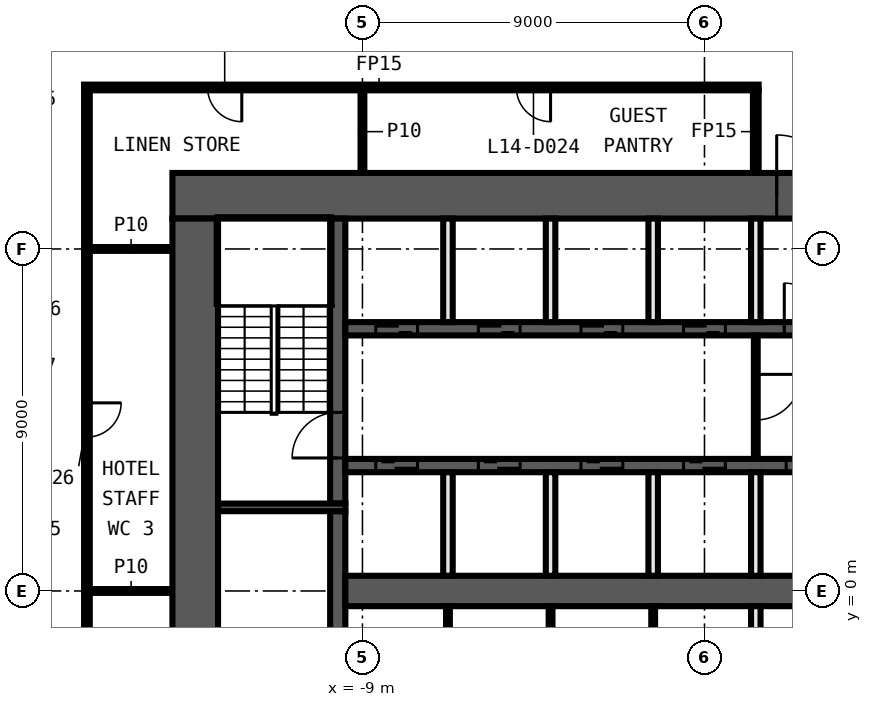
"""IFC4 building model, lengths in metres.
Left out: names, types, materials, properties, quantities, classifications, styles, units other than length and angle.
Written with IfcOpenShell. Run it as: python <this file> out.ifc"""

import sys

from ifc_helpers import new_model, si_unit, direction, frame, frame_2d, origin, place, context, subcontext, project, spatial, rectangle, extrude, element, fill, save


model = new_model("IFC4")
c1 = context("Model", 3, precision=1e-05, world=origin(), true_north=direction((0.0, 1.0)))
c2 = subcontext(c1, "Body", "Model", "MODEL_VIEW")
j1 = project(units=[si_unit("LENGTHUNIT", "METRE"), si_unit("PLANEANGLEUNIT", "RADIAN")], contexts=[c1])
p1 = place(None, origin())
s1 = spatial("IfcSite", under=j1, at=p1, CompositionType="ELEMENT")
p2 = place(p1, origin())
s2 = spatial("IfcBuilding", under=s1, at=p2, CompositionType="ELEMENT")
p3 = place(p2, frame((0.0, 0.0, 73.6)))
s3 = spatial("IfcBuildingStorey", under=s2, at=p3, CompositionType="ELEMENT", Elevation=73.6)
for number, where, z_axis, x_axis in (
    (1, (-16.175, 0.0, 0.0), (0.0, 0.0, 1.0), (1.0, 0.0, 0.0)),
    (2, (-16.175, 9.0, 0.0), (0.0, 0.0, 1.0), (1.0, 0.0, 0.0)),
):
    element("IfcWall", number, at=place(p3, frame(where, z_axis=z_axis, x_axis=x_axis)), inside=s3, PredefinedType="PARTITIONING", context=c2, shape_type="SweptSolid", body=[
        extrude(rectangle(XDim=2.175, YDim=0.1, at=frame_2d((1.087, 0.0))), origin(), (0.0, 0.0, 1.0), 3.3),
    ])
p4 = place(p3, frame((1.425, 13.25, 0.0), z_axis=(0.0, 0.0, 1.0), x_axis=(-1.0, 0.0, 0.0)))
e3 = element("IfcWall", 3, at=p4, inside=s3, PredefinedType="PARTITIONING", context=c2, shape_type="SweptSolid", body=[
    extrude(rectangle(XDim=17.75, YDim=0.15, at=frame_2d((8.875, 0.0))), origin(), (0.0, 0.0, 1.0), 3.3),
])
p5 = place(p4, frame((5.475, 0.0, 0.0)))
e4 = element("IfcOpeningElement", 4, at=p5, cuts=e3, PredefinedType="OPENING", context=c2, shape_type="SweptSolid", body=[
    extrude(rectangle(XDim=0.9, YDim=2.1, at=frame_2d((0.45, 1.05))), frame((0.0, 0.085, 0.0), z_axis=(0.0, -1.0, 0.0), x_axis=(1.0, 0.0, 0.0)), (0.0, 0.0, 1.0), 0.17),
])
p6 = place(p4, frame((13.6, 0.0, 0.0)))
e5 = element("IfcOpeningElement", 5, at=p6, cuts=e3, PredefinedType="OPENING", context=c2, shape_type="SweptSolid", body=[
    extrude(rectangle(XDim=0.9, YDim=2.1, at=frame_2d((0.45, 1.05))), frame((0.0, 0.085, 0.0), z_axis=(0.0, -1.0, 0.0), x_axis=(1.0, 0.0, 0.0)), (0.0, 0.0, 1.0), 0.17),
])
p7 = place(p3, frame((1.35, 11.0, 0.0), z_axis=(0.0, 0.0, 1.0), x_axis=(0.0, 1.0, 0.0)))
e6 = element("IfcWall", 6, at=p7, inside=s3, PredefinedType="PARTITIONING", context=c2, shape_type="SweptSolid", body=[
    extrude(rectangle(XDim=2.175, YDim=0.15, at=frame_2d((1.087, 0.0))), origin(), (0.0, 0.0, 1.0), 3.3),
])
p8 = place(p3, frame((-9.0, 11.0, 0.0), z_axis=(0.0, 0.0, 1.0), x_axis=(0.0, 1.0, 0.0)))
e7 = element("IfcWall", 7, at=p8, inside=s3, PredefinedType="PARTITIONING", context=c2, shape_type="SweptSolid", body=[
    extrude(rectangle(XDim=2.175, YDim=0.1, at=frame_2d((1.087, 0.0))), origin(), (0.0, 0.0, 1.0), 3.3),
])
p9 = place(p3, frame((-16.25, 13.175, 0.0), z_axis=(0.0, 0.0, 1.0), x_axis=(0.0, -1.0, 0.0)))
e8 = element("IfcWall", 8, at=p9, inside=s3, PredefinedType="PARTITIONING", context=c2, shape_type="SweptSolid", body=[
    extrude(rectangle(XDim=26.35, YDim=0.15, at=frame_2d((13.175, 0.0))), origin(), (0.0, 0.0, 1.0), 3.3),
])
p10 = place(p9, frame((17.225, 0.0, 0.0)))
e9 = element("IfcOpeningElement", 9, at=p10, cuts=e8, PredefinedType="OPENING", context=c2, shape_type="SweptSolid", body=[
    extrude(rectangle(XDim=0.9, YDim=2.1, at=frame_2d((0.45, 1.05))), frame((0.0, 0.085, 0.0), z_axis=(0.0, -1.0, 0.0), x_axis=(1.0, 0.0, 0.0)), (0.0, 0.0, 1.0), 0.17),
])
p11 = place(p9, frame((8.225, 0.0, 0.0)))
e10 = element("IfcOpeningElement", 10, at=p11, cuts=e8, PredefinedType="OPENING", context=c2, shape_type="SweptSolid", body=[
    extrude(rectangle(XDim=0.9, YDim=2.1, at=frame_2d((0.45, 1.05))), frame((0.0, 0.085, 0.0), z_axis=(0.0, -1.0, 0.0), x_axis=(1.0, 0.0, 0.0)), (0.0, 0.0, 1.0), 0.17),
])
p12 = place(p3, frame((-14.0, 10.4, 0.0), z_axis=(0.0, 0.0, 1.0), x_axis=(1.0, 0.0, 0.0)))
e11 = element("IfcWall", 11, at=p12, inside=s3, PredefinedType="SHEAR", context=c2, shape_type="SweptSolid", body=[
    extrude(rectangle(XDim=28.0, YDim=1.2, at=frame_2d((14.0, 0.0))), origin(), (0.0, 0.0, 1.0), 3.3),
])
p13 = place(p12, frame((15.9, 0.0, 0.0)))
e12 = element("IfcOpeningElement", 12, at=p13, cuts=e11, PredefinedType="OPENING", context=c2, shape_type="SweptSolid", body=[
    extrude(rectangle(XDim=1.6, YDim=2.1, at=frame_2d((0.8, 1.05))), frame((0.0, 0.61, 0.0), z_axis=(0.0, -1.0, 0.0), x_axis=(1.0, 0.0, 0.0)), (0.0, 0.0, 1.0), 1.22),
])
p14 = place(p3, frame((-13.4, -9.8, 0.0), z_axis=(0.0, 0.0, 1.0), x_axis=(0.0, 1.0, 0.0)))
e13 = element("IfcWall", 13, at=p14, inside=s3, PredefinedType="SHEAR", context=c2, shape_type="SweptSolid", body=[
    extrude(rectangle(XDim=19.6, YDim=1.2, at=frame_2d((9.8, 0.0))), origin(), (0.0, 0.0, 1.0), 3.3),
])
p15 = place(p3, frame((-9.65, -2.1, 0.0), z_axis=(0.0, 0.0, 1.0), x_axis=(0.0, 1.0, 0.0)))
e14 = element("IfcWall", 14, at=p15, inside=s3, PredefinedType="SHEAR", context=c2, shape_type="SweptSolid", body=[
    extrude(rectangle(XDim=4.2, YDim=0.4, at=frame_2d((2.1, 0.0))), origin(), (0.0, 0.0, 1.0), 3.3),
])
p16 = place(p3, frame((-9.65, 2.3, 0.0), z_axis=(0.0, 0.0, 1.0), x_axis=(0.0, 1.0, 0.0)))
e15 = element("IfcWall", 15, at=p16, inside=s3, PredefinedType="SHEAR", context=c2, shape_type="SweptSolid", body=[
    extrude(rectangle(XDim=7.5, YDim=0.4, at=frame_2d((3.75, 0.0))), origin(), (0.0, 0.0, 1.0), 3.3),
])
p17 = place(p16, frame((1.2, 0.0, 0.0)))
e16 = element("IfcOpeningElement", 16, at=p17, cuts=e15, PredefinedType="OPENING", context=c2, shape_type="SweptSolid", body=[
    extrude(rectangle(XDim=1.2, YDim=2.1, at=frame_2d((0.6, 1.05))), frame((0.0, 0.21, 0.0), z_axis=(0.0, -1.0, 0.0), x_axis=(1.0, 0.0, 0.0)), (0.0, 0.0, 1.0), 0.42),
])
p18 = place(p3, frame((-9.45, 2.2, 0.0), z_axis=(0.0, 0.0, 1.0), x_axis=(-1.0, 0.0, 0.0)))
e17 = element("IfcWall", 17, at=p18, inside=s3, PredefinedType="SHEAR", context=c2, shape_type="SweptSolid", body=[
    extrude(rectangle(XDim=3.35, YDim=0.2, at=frame_2d((1.675, 0.0))), origin(), (0.0, 0.0, 1.0), 3.3),
])
p19 = place(p3, frame((-9.45, 6.9, 0.0), z_axis=(0.0, 0.0, 1.0), x_axis=(1.0, 0.0, 0.0)))
e18 = element("IfcWall", 18, at=p19, inside=s3, PredefinedType="SHEAR", context=c2, shape_type="SweptSolid", body=[
    extrude(rectangle(XDim=18.9, YDim=0.35, at=frame_2d((9.45, 0.0))), origin(), (0.0, 0.0, 1.0), 3.3),
])
p20 = place(p19, frame((0.8, 0.0, 0.0)))
e19 = element("IfcOpeningElement", 19, at=p20, cuts=e18, PredefinedType="OPENING", context=c2, shape_type="SweptSolid", body=[
    extrude(rectangle(XDim=1.1, YDim=2.1, at=frame_2d((0.55, 1.05))), frame((0.0, 0.185, 0.0), z_axis=(0.0, -1.0, 0.0), x_axis=(1.0, 0.0, 0.0)), (0.0, 0.0, 1.0), 0.37),
])
p21 = place(p19, frame((3.5, 0.0, 0.0)))
e20 = element("IfcOpeningElement", 20, at=p21, cuts=e18, PredefinedType="OPENING", context=c2, shape_type="SweptSolid", body=[
    extrude(rectangle(XDim=1.1, YDim=2.1, at=frame_2d((0.55, 1.05))), frame((0.0, 0.185, 0.0), z_axis=(0.0, -1.0, 0.0), x_axis=(1.0, 0.0, 0.0)), (0.0, 0.0, 1.0), 0.37),
])
p22 = place(p19, frame((6.2, 0.0, 0.0)))
e21 = element("IfcOpeningElement", 21, at=p22, cuts=e18, PredefinedType="OPENING", context=c2, shape_type="SweptSolid", body=[
    extrude(rectangle(XDim=1.1, YDim=2.1, at=frame_2d((0.55, 1.05))), frame((0.0, 0.185, 0.0), z_axis=(0.0, -1.0, 0.0), x_axis=(1.0, 0.0, 0.0)), (0.0, 0.0, 1.0), 0.37),
])
p23 = place(p19, frame((8.9, 0.0, 0.0)))
e22 = element("IfcOpeningElement", 22, at=p23, cuts=e18, PredefinedType="OPENING", context=c2, shape_type="SweptSolid", body=[
    extrude(rectangle(XDim=1.1, YDim=2.1, at=frame_2d((0.55, 1.05))), frame((0.0, 0.185, 0.0), z_axis=(0.0, -1.0, 0.0), x_axis=(1.0, 0.0, 0.0)), (0.0, 0.0, 1.0), 0.37),
])
p24 = place(p19, frame((11.55, 0.0, 0.0)))
e23 = element("IfcOpeningElement", 23, at=p24, cuts=e18, PredefinedType="OPENING", context=c2, shape_type="SweptSolid", body=[
    extrude(rectangle(XDim=1.2, YDim=2.1, at=frame_2d((0.6, 1.05))), frame((0.0, 0.185, 0.0), z_axis=(0.0, -1.0, 0.0), x_axis=(1.0, 0.0, 0.0)), (0.0, 0.0, 1.0), 0.37),
])
p25 = place(p19, frame((14.3, 0.0, 0.0)))
e24 = element("IfcOpeningElement", 24, at=p25, cuts=e18, PredefinedType="OPENING", context=c2, shape_type="SweptSolid", body=[
    extrude(rectangle(XDim=1.1, YDim=2.1, at=frame_2d((0.55, 1.05))), frame((0.0, 0.185, 0.0), z_axis=(0.0, -1.0, 0.0), x_axis=(1.0, 0.0, 0.0)), (0.0, 0.0, 1.0), 0.37),
])
p26 = place(p19, frame((17.0, 0.0, 0.0)))
e25 = element("IfcOpeningElement", 25, at=p26, cuts=e18, PredefinedType="OPENING", context=c2, shape_type="SweptSolid", body=[
    extrude(rectangle(XDim=1.1, YDim=2.1, at=frame_2d((0.55, 1.05))), frame((0.0, 0.185, 0.0), z_axis=(0.0, -1.0, 0.0), x_axis=(1.0, 0.0, 0.0)), (0.0, 0.0, 1.0), 0.37),
])
p27 = place(p3, frame((9.45, 3.3, 0.0), z_axis=(0.0, 0.0, 1.0), x_axis=(-1.0, 0.0, 0.0)))
e26 = element("IfcWall", 26, at=p27, inside=s3, PredefinedType="SHEAR", context=c2, shape_type="SweptSolid", body=[
    extrude(rectangle(XDim=18.9, YDim=0.35, at=frame_2d((9.45, 0.0))), origin(), (0.0, 0.0, 1.0), 3.3),
])
p28 = place(p27, frame((17.0, 0.0, 0.0)))
e27 = element("IfcOpeningElement", 27, at=p28, cuts=e26, PredefinedType="OPENING", context=c2, shape_type="SweptSolid", body=[
    extrude(rectangle(XDim=1.1, YDim=2.1, at=frame_2d((0.55, 1.05))), frame((0.0, 0.185, 0.0), z_axis=(0.0, -1.0, 0.0), x_axis=(1.0, 0.0, 0.0)), (0.0, 0.0, 1.0), 0.37),
])
p29 = place(p27, frame((14.3, 0.0, 0.0)))
e28 = element("IfcOpeningElement", 28, at=p29, cuts=e26, PredefinedType="OPENING", context=c2, shape_type="SweptSolid", body=[
    extrude(rectangle(XDim=1.1, YDim=2.1, at=frame_2d((0.55, 1.05))), frame((0.0, 0.185, 0.0), z_axis=(0.0, -1.0, 0.0), x_axis=(1.0, 0.0, 0.0)), (0.0, 0.0, 1.0), 0.37),
])
p30 = place(p27, frame((11.6, 0.0, 0.0)))
e29 = element("IfcOpeningElement", 29, at=p30, cuts=e26, PredefinedType="OPENING", context=c2, shape_type="SweptSolid", body=[
    extrude(rectangle(XDim=1.1, YDim=2.1, at=frame_2d((0.55, 1.05))), frame((0.0, 0.185, 0.0), z_axis=(0.0, -1.0, 0.0), x_axis=(1.0, 0.0, 0.0)), (0.0, 0.0, 1.0), 0.37),
])
p31 = place(p27, frame((8.9, 0.0, 0.0)))
e30 = element("IfcOpeningElement", 30, at=p31, cuts=e26, PredefinedType="OPENING", context=c2, shape_type="SweptSolid", body=[
    extrude(rectangle(XDim=1.1, YDim=2.1, at=frame_2d((0.55, 1.05))), frame((0.0, 0.185, 0.0), z_axis=(0.0, -1.0, 0.0), x_axis=(1.0, 0.0, 0.0)), (0.0, 0.0, 1.0), 0.37),
])
p32 = place(p27, frame((6.2, 0.0, 0.0)))
e31 = element("IfcOpeningElement", 31, at=p32, cuts=e26, PredefinedType="OPENING", context=c2, shape_type="SweptSolid", body=[
    extrude(rectangle(XDim=1.1, YDim=2.1, at=frame_2d((0.55, 1.05))), frame((0.0, 0.185, 0.0), z_axis=(0.0, -1.0, 0.0), x_axis=(1.0, 0.0, 0.0)), (0.0, 0.0, 1.0), 0.37),
])
p33 = place(p27, frame((3.5, 0.0, 0.0)))
e32 = element("IfcOpeningElement", 32, at=p33, cuts=e26, PredefinedType="OPENING", context=c2, shape_type="SweptSolid", body=[
    extrude(rectangle(XDim=1.1, YDim=2.1, at=frame_2d((0.55, 1.05))), frame((0.0, 0.185, 0.0), z_axis=(0.0, -1.0, 0.0), x_axis=(1.0, 0.0, 0.0)), (0.0, 0.0, 1.0), 0.37),
])
p34 = place(p27, frame((0.9, 0.0, 0.0)))
e33 = element("IfcOpeningElement", 33, at=p34, cuts=e26, PredefinedType="OPENING", context=c2, shape_type="SweptSolid", body=[
    extrude(rectangle(XDim=0.9, YDim=2.1, at=frame_2d((0.45, 1.05))), frame((0.0, 0.185, 0.0), z_axis=(0.0, -1.0, 0.0), x_axis=(1.0, 0.0, 0.0)), (0.0, 0.0, 1.0), 0.37),
])
p35 = place(p3, frame((-9.45, 0.0, 0.0), z_axis=(0.0, 0.0, 1.0), x_axis=(1.0, 0.0, 0.0)))
e34 = element("IfcWall", 34, at=p35, inside=s3, PredefinedType="SHEAR", context=c2, shape_type="SweptSolid", body=[
    extrude(rectangle(XDim=18.9, YDim=0.8, at=frame_2d((9.45, 0.0))), origin(), (0.0, 0.0, 1.0), 3.3),
])
p36 = place(p3, frame((1.35, 6.725, 0.0), z_axis=(0.0, 0.0, 1.0), x_axis=(0.0, -1.0, 0.0)))
e35 = element("IfcWall", 35, at=p36, inside=s3, PredefinedType="PARTITIONING", context=c2, shape_type="SweptSolid", body=[
    extrude(rectangle(XDim=3.25, YDim=0.1, at=frame_2d((1.625, 0.0))), origin(), (0.0, 0.0, 1.0), 3.3),
])
p37 = place(p36, frame((1.025, 0.0, 0.0)))
e36 = element("IfcOpeningElement", 36, at=p37, cuts=e35, PredefinedType="OPENING", context=c2, shape_type="SweptSolid", body=[
    extrude(rectangle(XDim=1.2, YDim=2.1, at=frame_2d((0.6, 1.05))), frame((0.0, 0.06, 0.0), z_axis=(0.0, -1.0, 0.0), x_axis=(1.0, 0.0, 0.0)), (0.0, 0.0, 1.0), 0.12),
])
for number, where, z_axis, x_axis in (
    (37, (1.35, -3.125, 0.0), (0.0, 0.0, 1.0), (0.0, 1.0, 0.0)),
    (38, (1.35, 0.4, 0.0), (0.0, 0.0, 1.0), (0.0, 1.0, 0.0)),
    (39, (1.35, 7.075, 0.0), (0.0, 0.0, 1.0), (0.0, 1.0, 0.0)),
):
    element("IfcWall", number, at=place(p3, frame(where, z_axis=z_axis, x_axis=x_axis)), inside=s3, PredefinedType="SOLIDWALL", context=c2, shape_type="SweptSolid", body=[
        extrude(rectangle(XDim=2.725, YDim=0.25, at=frame_2d((1.363, 0.0))), origin(), (0.0, 0.0, 1.0), 3.3),
    ])
p38 = place(p3, frame((-1.35, -3.125, 0.0), z_axis=(0.0, 0.0, 1.0), x_axis=(0.0, 1.0, 0.0)))
e40 = element("IfcWall", 40, at=p38, inside=s3, PredefinedType="PARTITIONING", context=c2, shape_type="SweptSolid", body=[
    extrude(rectangle(XDim=2.725, YDim=0.1, at=frame_2d((1.363, 0.0))), origin(), (0.0, 0.0, 1.0), 3.3),
])
for number, where, z_axis, x_axis in (
    (41, (-1.35, 0.4, 0.0), (0.0, 0.0, 1.0), (0.0, 1.0, 0.0)),
    (42, (-1.35, 7.075, 0.0), (0.0, 0.0, 1.0), (0.0, 1.0, 0.0)),
):
    element("IfcWall", number, at=place(p3, frame(where, z_axis=z_axis, x_axis=x_axis)), inside=s3, PredefinedType="SOLIDWALL", context=c2, shape_type="SweptSolid", body=[
        extrude(rectangle(XDim=2.725, YDim=0.25, at=frame_2d((1.363, 0.0))), origin(), (0.0, 0.0, 1.0), 3.3),
    ])
p39 = place(p3, frame((-4.05, -3.125, 0.0), z_axis=(0.0, 0.0, 1.0), x_axis=(0.0, 1.0, 0.0)))
e43 = element("IfcWall", 43, at=p39, inside=s3, PredefinedType="PARTITIONING", context=c2, shape_type="SweptSolid", body=[
    extrude(rectangle(XDim=2.725, YDim=0.1, at=frame_2d((1.363, 0.0))), origin(), (0.0, 0.0, 1.0), 3.3),
])
for number, where, z_axis, x_axis in (
    (44, (-4.05, 0.4, 0.0), (0.0, 0.0, 1.0), (0.0, 1.0, 0.0)),
    (45, (-4.05, 7.075, 0.0), (0.0, 0.0, 1.0), (0.0, 1.0, 0.0)),
):
    element("IfcWall", number, at=place(p3, frame(where, z_axis=z_axis, x_axis=x_axis)), inside=s3, PredefinedType="SOLIDWALL", context=c2, shape_type="SweptSolid", body=[
        extrude(rectangle(XDim=2.725, YDim=0.25, at=frame_2d((1.363, 0.0))), origin(), (0.0, 0.0, 1.0), 3.3),
    ])
p40 = place(p3, frame((-6.75, -3.125, 0.0), z_axis=(0.0, 0.0, 1.0), x_axis=(0.0, 1.0, 0.0)))
e46 = element("IfcWall", 46, at=p40, inside=s3, PredefinedType="PARTITIONING", context=c2, shape_type="SweptSolid", body=[
    extrude(rectangle(XDim=2.725, YDim=0.1, at=frame_2d((1.363, 0.0))), origin(), (0.0, 0.0, 1.0), 3.3),
])
for number, where, z_axis, x_axis in (
    (47, (-6.75, 0.4, 0.0), (0.0, 0.0, 1.0), (0.0, 1.0, 0.0)),
    (48, (-6.75, 7.075, 0.0), (0.0, 0.0, 1.0), (0.0, 1.0, 0.0)),
):
    element("IfcWall", number, at=place(p3, frame(where, z_axis=z_axis, x_axis=x_axis)), inside=s3, PredefinedType="SOLIDWALL", context=c2, shape_type="SweptSolid", body=[
        extrude(rectangle(XDim=2.725, YDim=0.25, at=frame_2d((1.363, 0.0))), origin(), (0.0, 0.0, 1.0), 3.3),
    ])
p41 = place(p5, origin())
e49 = element("IfcDoor", 49, at=p41, inside=s3, OperationType="SINGLE_SWING_RIGHT", PredefinedType="DOOR", context=c2, shape_type="SweptSolid", body=[
    extrude(rectangle(XDim=0.9, YDim=2.1, at=frame_2d((0.45, 1.05))), frame((0.0, 0.025, 0.0), z_axis=(0.0, -1.0, 0.0), x_axis=(1.0, 0.0, 0.0)), (0.0, 0.0, 1.0), 0.05),
])
fill(e4, e49)
p42 = place(p6, origin())
e50 = element("IfcDoor", 50, at=p42, inside=s3, OperationType="SINGLE_SWING_LEFT", PredefinedType="DOOR", context=c2, shape_type="SweptSolid", body=[
    extrude(rectangle(XDim=0.9, YDim=2.1, at=frame_2d((0.45, 1.05))), frame((0.0, 0.025, 0.0), z_axis=(0.0, -1.0, 0.0), x_axis=(1.0, 0.0, 0.0)), (0.0, 0.0, 1.0), 0.05),
])
fill(e5, e50)
p43 = place(p11, origin())
e51 = element("IfcDoor", 51, at=p43, inside=s3, OperationType="SINGLE_SWING_RIGHT", PredefinedType="DOOR", context=c2, shape_type="SweptSolid", body=[
    extrude(rectangle(XDim=0.9, YDim=2.1, at=frame_2d((0.45, 1.05))), frame((0.0, 0.025, 0.0), z_axis=(0.0, -1.0, 0.0), x_axis=(1.0, 0.0, 0.0)), (0.0, 0.0, 1.0), 0.05),
])
fill(e10, e51)
p44 = place(p20, origin())
e52 = element("IfcDoor", 52, at=p44, inside=s3, OperationType="DOUBLE_DOOR_SLIDING", PredefinedType="DOOR", context=c2, shape_type="SweptSolid", body=[
    extrude(rectangle(XDim=1.1, YDim=2.1, at=frame_2d((0.55, 1.05))), frame((0.0, 0.025, 0.0), z_axis=(0.0, -1.0, 0.0), x_axis=(1.0, 0.0, 0.0)), (0.0, 0.0, 1.0), 0.05),
])
fill(e19, e52)
p45 = place(p21, origin())
e53 = element("IfcDoor", 53, at=p45, inside=s3, OperationType="DOUBLE_DOOR_SLIDING", PredefinedType="DOOR", context=c2, shape_type="SweptSolid", body=[
    extrude(rectangle(XDim=1.1, YDim=2.1, at=frame_2d((0.55, 1.05))), frame((0.0, 0.025, 0.0), z_axis=(0.0, -1.0, 0.0), x_axis=(1.0, 0.0, 0.0)), (0.0, 0.0, 1.0), 0.05),
])
fill(e20, e53)
p46 = place(p22, origin())
e54 = element("IfcDoor", 54, at=p46, inside=s3, OperationType="DOUBLE_DOOR_SLIDING", PredefinedType="DOOR", context=c2, shape_type="SweptSolid", body=[
    extrude(rectangle(XDim=1.1, YDim=2.1, at=frame_2d((0.55, 1.05))), frame((0.0, 0.025, 0.0), z_axis=(0.0, -1.0, 0.0), x_axis=(1.0, 0.0, 0.0)), (0.0, 0.0, 1.0), 0.05),
])
fill(e21, e54)
p47 = place(p23, origin())
e55 = element("IfcDoor", 55, at=p47, inside=s3, OperationType="DOUBLE_DOOR_SLIDING", PredefinedType="DOOR", context=c2, shape_type="SweptSolid", body=[
    extrude(rectangle(XDim=1.1, YDim=2.1, at=frame_2d((0.55, 1.05))), frame((0.0, 0.025, 0.0), z_axis=(0.0, -1.0, 0.0), x_axis=(1.0, 0.0, 0.0)), (0.0, 0.0, 1.0), 0.05),
])
fill(e22, e55)
p48 = place(p13, origin())
e56 = element("IfcDoor", 56, at=p48, inside=s3, OperationType="DOUBLE_DOOR_SINGLE_SWING", PredefinedType="DOOR", context=c2, shape_type="SweptSolid", body=[
    extrude(rectangle(XDim=1.6, YDim=2.1, at=frame_2d((0.8, 1.05))), frame((0.0, 0.025, 0.0), z_axis=(0.0, -1.0, 0.0), x_axis=(1.0, 0.0, 0.0)), (0.0, 0.0, 1.0), 0.05),
])
fill(e12, e56)
p49 = place(p24, origin())
e57 = element("IfcDoor", 57, at=p49, inside=s3, OperationType="SINGLE_SWING_LEFT", PredefinedType="DOOR", context=c2, shape_type="SweptSolid", body=[
    extrude(rectangle(XDim=1.2, YDim=2.1, at=frame_2d((0.6, 1.05))), frame((0.0, 0.025, 0.0), z_axis=(0.0, -1.0, 0.0), x_axis=(1.0, 0.0, 0.0)), (0.0, 0.0, 1.0), 0.05),
])
fill(e23, e57)
p50 = place(p28, origin())
e58 = element("IfcDoor", 58, at=p50, inside=s3, OperationType="DOUBLE_DOOR_SLIDING", PredefinedType="DOOR", context=c2, shape_type="SweptSolid", body=[
    extrude(rectangle(XDim=1.1, YDim=2.1, at=frame_2d((0.55, 1.05))), frame((0.0, 0.025, 0.0), z_axis=(0.0, -1.0, 0.0), x_axis=(1.0, 0.0, 0.0)), (0.0, 0.0, 1.0), 0.05),
])
fill(e27, e58)
p51 = place(p29, origin())
e59 = element("IfcDoor", 59, at=p51, inside=s3, OperationType="DOUBLE_DOOR_SLIDING", PredefinedType="DOOR", context=c2, shape_type="SweptSolid", body=[
    extrude(rectangle(XDim=1.1, YDim=2.1, at=frame_2d((0.55, 1.05))), frame((0.0, 0.025, 0.0), z_axis=(0.0, -1.0, 0.0), x_axis=(1.0, 0.0, 0.0)), (0.0, 0.0, 1.0), 0.05),
])
fill(e28, e59)
p52 = place(p30, origin())
e60 = element("IfcDoor", 60, at=p52, inside=s3, OperationType="DOUBLE_DOOR_SLIDING", PredefinedType="DOOR", context=c2, shape_type="SweptSolid", body=[
    extrude(rectangle(XDim=1.1, YDim=2.1, at=frame_2d((0.55, 1.05))), frame((0.0, 0.025, 0.0), z_axis=(0.0, -1.0, 0.0), x_axis=(1.0, 0.0, 0.0)), (0.0, 0.0, 1.0), 0.05),
])
fill(e29, e60)
p53 = place(p31, origin())
e61 = element("IfcDoor", 61, at=p53, inside=s3, OperationType="DOUBLE_DOOR_SLIDING", PredefinedType="DOOR", context=c2, shape_type="SweptSolid", body=[
    extrude(rectangle(XDim=1.1, YDim=2.1, at=frame_2d((0.55, 1.05))), frame((0.0, 0.025, 0.0), z_axis=(0.0, -1.0, 0.0), x_axis=(1.0, 0.0, 0.0)), (0.0, 0.0, 1.0), 0.05),
])
fill(e30, e61)
p54 = place(p32, origin())
e62 = element("IfcDoor", 62, at=p54, inside=s3, OperationType="DOUBLE_DOOR_SLIDING", PredefinedType="DOOR", context=c2, shape_type="SweptSolid", body=[
    extrude(rectangle(XDim=1.1, YDim=2.1, at=frame_2d((0.55, 1.05))), frame((0.0, 0.025, 0.0), z_axis=(0.0, -1.0, 0.0), x_axis=(1.0, 0.0, 0.0)), (0.0, 0.0, 1.0), 0.05),
])
fill(e31, e62)
p55 = place(p17, origin())
e63 = element("IfcDoor", 63, at=p55, inside=s3, OperationType="SINGLE_SWING_RIGHT", PredefinedType="DOOR", context=c2, shape_type="SweptSolid", body=[
    extrude(rectangle(XDim=1.2, YDim=2.1, at=frame_2d((0.6, 1.05))), frame((0.0, 0.025, 0.0), z_axis=(0.0, -1.0, 0.0), x_axis=(1.0, 0.0, 0.0)), (0.0, 0.0, 1.0), 0.05),
])
fill(e16, e63)
p56 = place(p37, origin())
e64 = element("IfcDoor", 64, at=p56, inside=s3, OperationType="SINGLE_SWING_LEFT", PredefinedType="DOOR", context=c2, shape_type="SweptSolid", body=[
    extrude(rectangle(XDim=1.2, YDim=2.1, at=frame_2d((0.6, 1.05))), frame((0.0, 0.025, 0.0), z_axis=(0.0, -1.0, 0.0), x_axis=(1.0, 0.0, 0.0)), (0.0, 0.0, 1.0), 0.05),
])
fill(e36, e64)
save(model, sys.argv[1])
